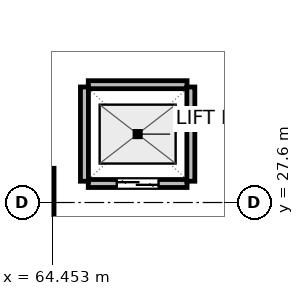
"""IFC4 building model, lengths in metres.
Left out: names, types, materials, properties, quantities, classifications, styles, units other than length and angle.
Written with IfcOpenShell. Run it as: python <this file> out.ifc"""

import sys

from ifc_helpers import new_model, si_unit, direction, frame, frame_2d, origin, origin_2d, place, context, subcontext, project, spatial, rectangle, extrude, element, fill, save


model = new_model("IFC4")
c1 = context("Model", 3, precision=1e-05, world=origin(), true_north=direction((0.0, 1.0)))
c2 = subcontext(c1, "Body", "Model", "MODEL_VIEW")
j1 = project(units=[si_unit("LENGTHUNIT", "METRE"), si_unit("PLANEANGLEUNIT", "RADIAN")], contexts=[c1])
p1 = place(None, origin())
s1 = spatial("IfcSite", under=j1, at=p1, CompositionType="ELEMENT")
p2 = place(p1, origin())
s2 = spatial("IfcBuilding", under=s1, at=p2, CompositionType="ELEMENT")
p3 = place(p2, frame((0.0, 0.0, -4.5)))
s3 = spatial("IfcBuildingStorey", under=s2, at=p3, CompositionType="ELEMENT", Elevation=-4.5)
p4 = place(p3, frame((63.6, 27.6, 0.0), z_axis=(0.0, 0.0, 1.0), x_axis=(1.0, 0.0, 0.0)))
e1 = element("IfcColumn", 1, at=p4, inside=s3, PredefinedType="COLUMN", context=c2, shape_type="SweptSolid", body=[
    extrude(rectangle(XDim=1.8, YDim=1.8, at=origin_2d()), origin(), (0.0, 0.0, 1.0), 4.5),
])
p5 = place(p3, frame((65.4, 28.1, 0.0), z_axis=(0.0, 0.0, 1.0), x_axis=(1.0, 0.0, 0.0)))
e2 = element("IfcWall", 2, at=p5, inside=s3, PredefinedType="PARTITIONING", context=c2, shape_type="SweptSolid", body=[
    extrude(rectangle(XDim=2.6, YDim=0.21, at=frame_2d((1.3, 0.0))), origin(), (0.0, 0.0, 1.0), 4.18),
])
p6 = place(p5, frame((0.75, 0.0, 0.0)))
e3 = element("IfcOpeningElement", 3, at=p6, cuts=e2, PredefinedType="OPENING", context=c2, shape_type="SweptSolid", body=[
    extrude(rectangle(XDim=1.1, YDim=2.04, at=frame_2d((0.55, 1.02))), frame((0.0, 0.115, 0.0), z_axis=(0.0, -1.0, 0.0), x_axis=(1.0, 0.0, 0.0)), (0.0, 0.0, 1.0), 0.23),
])
p7 = place(p3, frame((65.4, 30.7, 0.0), z_axis=(0.0, 0.0, 1.0), x_axis=(1.0, 0.0, 0.0)))
e4 = element("IfcWall", 4, at=p7, inside=s3, PredefinedType="PARTITIONING", context=c2, shape_type="SweptSolid", body=[
    extrude(rectangle(XDim=2.6, YDim=0.21, at=frame_2d((1.3, 0.0))), origin(), (0.0, 0.0, 1.0), 4.18),
])
for number, where, z_axis, x_axis in (
    (5, (65.3, 28.16, 0.0), (0.0, 0.0, 1.0), (0.0, 1.0, 0.0)),
    (6, (68.1, 28.16, 0.0), (0.0, 0.0, 1.0), (0.0, 1.0, 0.0)),
):
    element("IfcWall", number, at=place(p3, frame(where, z_axis=z_axis, x_axis=x_axis)), inside=s3, PredefinedType="PARTITIONING", context=c2, shape_type="SweptSolid", body=[
        extrude(rectangle(XDim=2.48, YDim=0.21, at=frame_2d((1.24, 0.0))), origin(), (0.0, 0.0, 1.0), 4.18),
    ])
p8 = place(p6, origin())
e7 = element("IfcDoor", 7, at=p8, inside=s3, OperationType="DOUBLE_DOOR_SLIDING", PredefinedType="DOOR", context=c2, shape_type="SweptSolid", body=[
    extrude(rectangle(XDim=1.1, YDim=2.04, at=frame_2d((0.55, 1.02))), frame((0.0, 0.025, 0.0), z_axis=(0.0, -1.0, 0.0), x_axis=(1.0, 0.0, 0.0)), (0.0, 0.0, 1.0), 0.05),
])
fill(e3, e7)
save(model, sys.argv[1])
